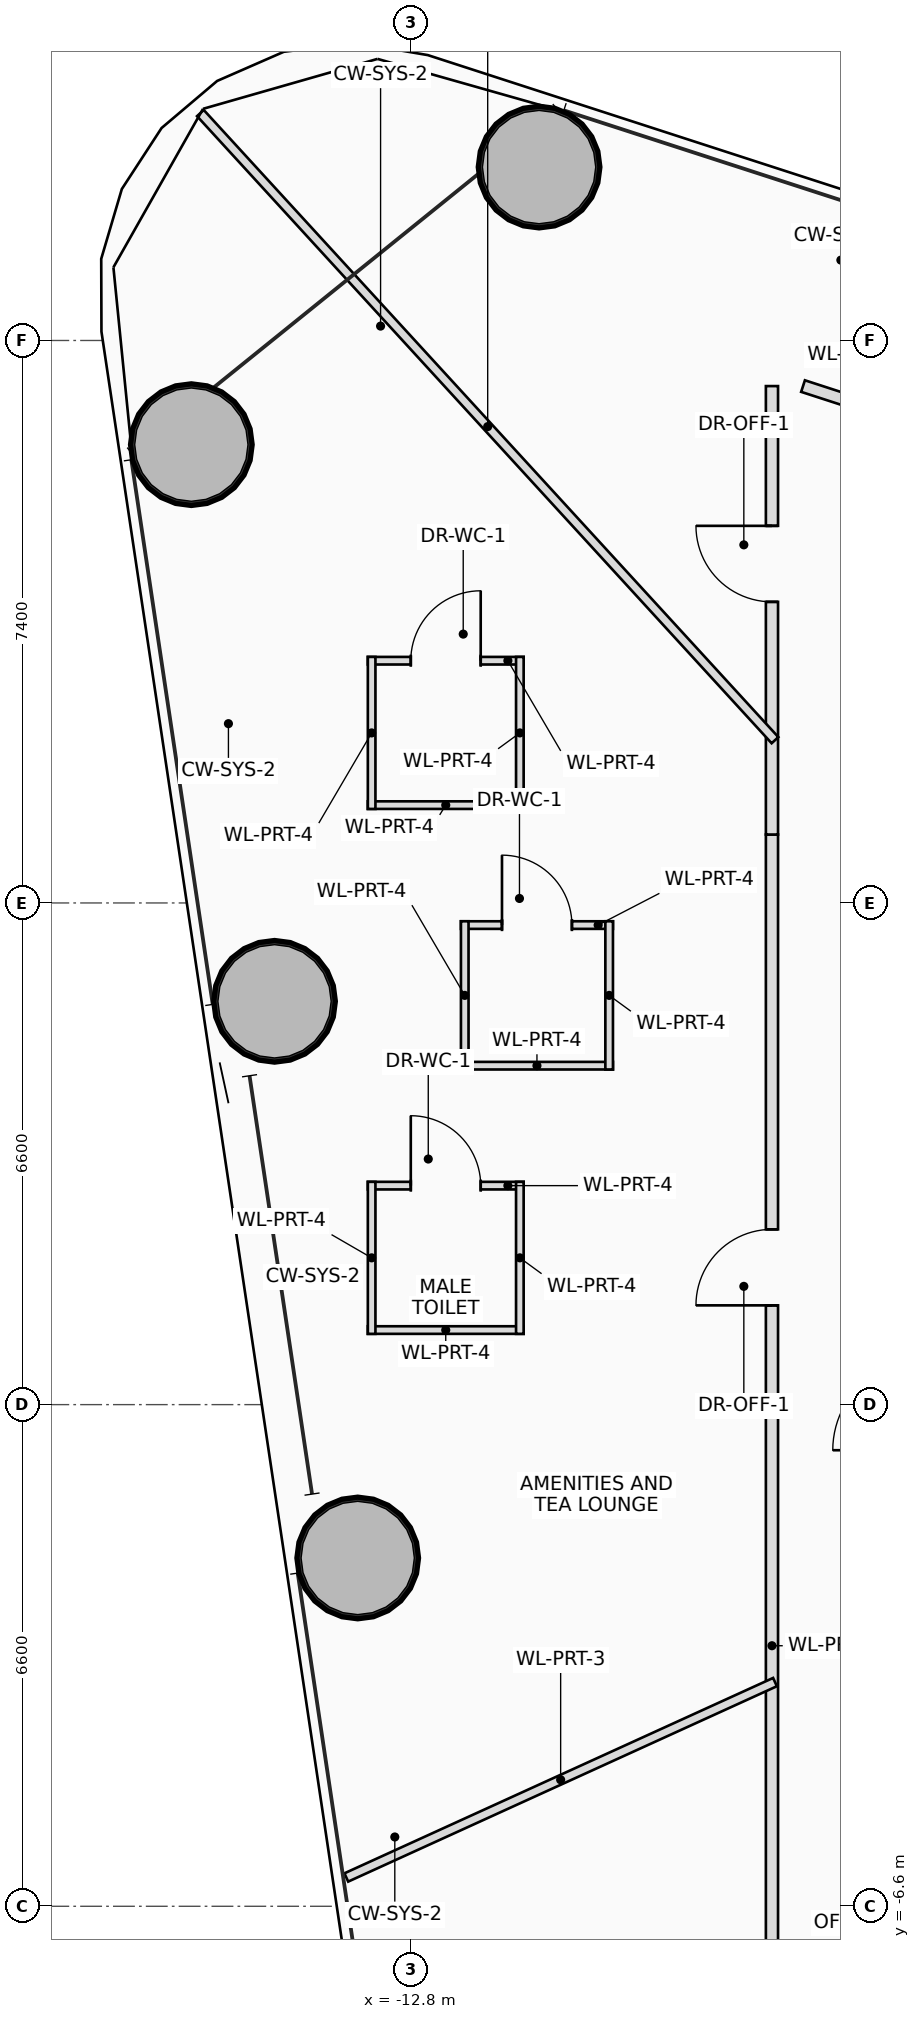
"""IFC4 building model, lengths in metres.
Left out: names, types, materials, properties, quantities, classifications, styles, units other than length and angle.
Written with IfcOpenShell. Run it as: python <this file> out.ifc"""

import sys

from ifc_helpers import new_model, si_unit, direction, frame, frame_2d, origin, origin_2d, place, context, subcontext, project, spatial, rectangle, hollow_circle, extrude, source, transform, mapped, element, fill, save


model = new_model("IFC4")
c1 = context("Model", 3, precision=1e-05, world=origin(), true_north=direction((0.0, 1.0)))
c2 = subcontext(c1, "Body", "Model", "MODEL_VIEW")
j1 = project(units=[si_unit("LENGTHUNIT", "METRE"), si_unit("PLANEANGLEUNIT", "RADIAN")], contexts=[c1])
p1 = place(None, origin())
s1 = spatial("IfcSite", under=j1, at=p1, CompositionType="ELEMENT")
p2 = place(p1, origin())
s2 = spatial("IfcBuilding", under=s1, at=p2, CompositionType="ELEMENT")
p3 = place(p2, frame((0.0, 0.0, 62.3)))
s3 = spatial("IfcBuildingStorey", under=s2, at=p3, CompositionType="ELEMENT", Elevation=62.3)
m1 = source(origin(), c2, "Body", "SweptSolid", [
    extrude(hollow_circle(Radius=0.8, WallThickness=0.055, at=origin_2d()), origin(), (0.0, 0.0, 1.0), 3.75),
])
for number, where, z_axis, x_axis in (
    (1, (-11.114, 16.281, 0.0), (0.0, 0.0, 1.0), (1.0, 0.0, 0.0)),
    (2, (-15.689, 12.629, 0.0), (0.0, 0.0, 1.0), (1.0, 0.0, 0.0)),
    (3, (-14.594, 5.306, 0.0), (0.0, 0.0, 1.0), (1.0, 0.0, 0.0)),
    (4, (-13.5, -2.018, 0.0), (0.0, 0.0, 1.0), (1.0, 0.0, 0.0)),
):
    element("IfcColumn", number, at=place(p3, frame(where, z_axis=z_axis, x_axis=x_axis)), inside=s3, PredefinedType="COLUMN", context=c2, shape_type="MappedRepresentation", body=[
        mapped(m1, transform((0.0, 0.0, 0.0), scale=1.0)),
    ])
p4 = place(p3, frame((-13.367, 2.881, 0.0), z_axis=(0.0, 0.0, 1.0), x_axis=(1.0, 0.0, 0.0)))
e5 = element("IfcWall", 5, at=p4, inside=s3, PredefinedType="PARTITIONING", context=c2, shape_type="SweptSolid", body=[
    extrude(rectangle(XDim=2.05, YDim=0.1, at=frame_2d((1.025, 0.0))), origin(), (0.0, 0.0, 1.0), 3.2),
])
p5 = place(p4, frame((0.565, 0.0, 0.0)))
e6 = element("IfcOpeningElement", 6, at=p5, cuts=e5, PredefinedType="OPENING", context=c2, shape_type="SweptSolid", body=[
    extrude(rectangle(XDim=0.92, YDim=2.1, at=frame_2d((0.46, 1.05))), frame((0.0, 0.06, 0.0), z_axis=(0.0, -1.0, 0.0), x_axis=(1.0, 0.0, 0.0)), (0.0, 0.0, 1.0), 0.12),
])
p6 = place(p3, frame((-11.317, 0.981, 0.0), z_axis=(0.0, 0.0, 1.0), x_axis=(-1.0, 0.0, 0.0)))
e7 = element("IfcWall", 7, at=p6, inside=s3, PredefinedType="PARTITIONING", context=c2, shape_type="SweptSolid", body=[
    extrude(rectangle(XDim=2.05, YDim=0.1, at=frame_2d((1.025, 0.0))), origin(), (0.0, 0.0, 1.0), 3.545),
])
p7 = place(p3, frame((-11.367, 2.931, 0.0), z_axis=(0.0, 0.0, 1.0), x_axis=(0.0, -1.0, 0.0)))
e8 = element("IfcWall", 8, at=p7, inside=s3, PredefinedType="PARTITIONING", context=c2, shape_type="SweptSolid", body=[
    extrude(rectangle(XDim=2.0, YDim=0.1, at=frame_2d((1.0, 0.0))), origin(), (0.0, 0.0, 1.0), 3.2),
])
p8 = place(p3, frame((-13.317, 0.931, 0.0), z_axis=(0.0, 0.0, 1.0), x_axis=(0.0, 1.0, 0.0)))
e9 = element("IfcWall", 9, at=p8, inside=s3, PredefinedType="PARTITIONING", context=c2, shape_type="SweptSolid", body=[
    extrude(rectangle(XDim=2.0, YDim=0.1, at=frame_2d((1.0, 0.0))), origin(), (0.0, 0.0, 1.0), 3.545),
])
p9 = place(p3, frame((-13.367, 9.787, 0.0), z_axis=(0.0, 0.0, 1.0), x_axis=(1.0, 0.0, 0.0)))
e10 = element("IfcWall", 10, at=p9, inside=s3, PredefinedType="PARTITIONING", context=c2, shape_type="SweptSolid", body=[
    extrude(rectangle(XDim=2.05, YDim=0.1, at=frame_2d((1.025, 0.0))), origin(), (0.0, 0.0, 1.0), 2.85),
])
p10 = place(p9, frame((0.565, 0.0, 0.0)))
e11 = element("IfcOpeningElement", 11, at=p10, cuts=e10, PredefinedType="OPENING", context=c2, shape_type="SweptSolid", body=[
    extrude(rectangle(XDim=0.92, YDim=2.1, at=frame_2d((0.46, 1.05))), frame((0.0, 0.06, 0.0), z_axis=(0.0, -1.0, 0.0), x_axis=(1.0, 0.0, 0.0)), (0.0, 0.0, 1.0), 0.12),
])
p11 = place(p3, frame((-11.317, 7.887, 0.0), z_axis=(0.0, 0.0, 1.0), x_axis=(-1.0, 0.0, 0.0)))
e12 = element("IfcWall", 12, at=p11, inside=s3, PredefinedType="PARTITIONING", context=c2, shape_type="SweptSolid", body=[
    extrude(rectangle(XDim=2.05, YDim=0.1, at=frame_2d((1.025, 0.0))), origin(), (0.0, 0.0, 1.0), 3.2),
])
p12 = place(p3, frame((-11.367, 9.837, 0.0), z_axis=(0.0, 0.0, 1.0), x_axis=(0.0, -1.0, 0.0)))
e13 = element("IfcWall", 13, at=p12, inside=s3, PredefinedType="PARTITIONING", context=c2, shape_type="SweptSolid", body=[
    extrude(rectangle(XDim=2.0, YDim=0.1, at=frame_2d((1.0, 0.0))), origin(), (0.0, 0.0, 1.0), 2.85),
])
p13 = place(p3, frame((-13.317, 7.837, 0.0), z_axis=(0.0, 0.0, 1.0), x_axis=(0.0, 1.0, 0.0)))
e14 = element("IfcWall", 14, at=p13, inside=s3, PredefinedType="PARTITIONING", context=c2, shape_type="SweptSolid", body=[
    extrude(rectangle(XDim=2.0, YDim=0.1, at=frame_2d((1.0, 0.0))), origin(), (0.0, 0.0, 1.0), 3.545),
])
p14 = place(p3, frame((-12.142, 6.309, 0.0), z_axis=(0.0, 0.0, 1.0), x_axis=(1.0, 0.0, 0.0)))
e15 = element("IfcWall", 15, at=p14, inside=s3, PredefinedType="PARTITIONING", context=c2, shape_type="SweptSolid", body=[
    extrude(rectangle(XDim=2.0, YDim=0.1, at=frame_2d((1.0, 0.0))), origin(), (0.0, 0.0, 1.0), 3.05),
])
p15 = place(p14, frame((0.54, 0.0, 0.0)))
e16 = element("IfcOpeningElement", 16, at=p15, cuts=e15, PredefinedType="OPENING", context=c2, shape_type="SweptSolid", body=[
    extrude(rectangle(XDim=0.92, YDim=2.1, at=frame_2d((0.46, 1.05))), frame((0.0, 0.06, 0.0), z_axis=(0.0, -1.0, 0.0), x_axis=(1.0, 0.0, 0.0)), (0.0, 0.0, 1.0), 0.12),
])
p16 = place(p3, frame((-10.142, 4.459, 0.0), z_axis=(0.0, 0.0, 1.0), x_axis=(-1.0, 0.0, 0.0)))
e17 = element("IfcWall", 17, at=p16, inside=s3, PredefinedType="PARTITIONING", context=c2, shape_type="SweptSolid", body=[
    extrude(rectangle(XDim=2.0, YDim=0.1, at=frame_2d((1.0, 0.0))), origin(), (0.0, 0.0, 1.0), 3.2),
])
for number, where, z_axis, x_axis in (
    (18, (-10.192, 6.359, 0.0), (0.0, 0.0, 1.0), (0.0, -1.0, 0.0)),
    (19, (-12.092, 4.409, 0.0), (0.0, 0.0, 1.0), (0.0, 1.0, 0.0)),
):
    element("IfcWall", number, at=place(p3, frame(where, z_axis=z_axis, x_axis=x_axis)), inside=s3, PredefinedType="PARTITIONING", context=c2, shape_type="SweptSolid", body=[
        extrude(rectangle(XDim=1.95, YDim=0.1, at=frame_2d((0.975, 0.0))), origin(), (0.0, 0.0, 1.0), 2.85),
    ])
p17 = place(p3, frame((-8.05, -7.5, 0.0), z_axis=(0.0, 0.0, 1.0), x_axis=(0.0, 1.0, 0.0)))
e20 = element("IfcWall", 20, at=p17, inside=s3, PredefinedType="PARTITIONING", context=c2, shape_type="SweptSolid", body=[
    extrude(rectangle(XDim=15.0, YDim=0.16, at=frame_2d((7.5, 0.0))), origin(), (0.0, 0.0, 1.0), 2.85),
])
p18 = place(p17, frame((8.806, 0.0, 0.0)))
e21 = element("IfcOpeningElement", 21, at=p18, cuts=e20, PredefinedType="OPENING", context=c2, shape_type="SweptSolid", body=[
    extrude(rectangle(XDim=1.0, YDim=2.25, at=frame_2d((0.5, 1.125))), frame((0.0, 0.09, 0.0), z_axis=(0.0, -1.0, 0.0), x_axis=(1.0, 0.0, 0.0)), (0.0, 0.0, 1.0), 0.18),
])
p19 = place(p3, frame((-8.05, 7.5, 0.0), z_axis=(0.0, 0.0, 1.0), x_axis=(0.0, 1.0, 0.0)))
e22 = element("IfcWall", 22, at=p19, inside=s3, PredefinedType="PARTITIONING", context=c2, shape_type="SweptSolid", body=[
    extrude(rectangle(XDim=5.9, YDim=0.16, at=frame_2d((2.95, 0.0))), origin(), (0.0, 0.0, 1.0), 2.85),
])
p20 = place(p19, frame((3.061, 0.0, 0.0)))
e23 = element("IfcOpeningElement", 23, at=p20, cuts=e22, PredefinedType="OPENING", context=c2, shape_type="SweptSolid", body=[
    extrude(rectangle(XDim=1.0, YDim=2.25, at=frame_2d((0.5, 1.125))), frame((0.0, 0.09, 0.0), z_axis=(0.0, -1.0, 0.0), x_axis=(1.0, 0.0, 0.0)), (0.0, 0.0, 1.0), 0.18),
])
p21 = place(p3, frame((-7.641, 13.4, 0.0), z_axis=(0.0, 0.0, 1.0), x_axis=(0.951277022007, -0.308337521884, 0.0)))
e24 = element("IfcWall", 24, at=p21, inside=s3, PredefinedType="PARTITIONING", context=c2, shape_type="SweptSolid", body=[
    extrude(rectangle(XDim=1.357, YDim=0.16, at=frame_2d((0.679, 0.0))), origin(), (0.0, 0.0, 1.0), 3.545),
])
p22 = place(p3, frame((-8.01, 8.741, 0.0), z_axis=(0.0, 0.0, 1.0), x_axis=(-0.675595196102, 0.737272765674, 0.0)))
e25 = element("IfcWall", 25, at=p22, inside=s3, PredefinedType="PARTITIONING", context=c2, shape_type="SweptSolid", body=[
    extrude(rectangle(XDim=11.19, YDim=0.12, at=frame_2d((5.595, 0.0))), origin(), (0.0, 0.0, 1.0), 3.01),
])
p23 = place(p3, frame((-8.01, -3.65, 0.0), z_axis=(0.0, 0.0, 1.0), x_axis=(-0.909955974898, -0.414704863425, 0.0)))
e26 = element("IfcWall", 26, at=p23, inside=s3, PredefinedType="PARTITIONING", context=c2, shape_type="SweptSolid", body=[
    extrude(rectangle(XDim=6.198, YDim=0.12, at=frame_2d((3.099, 0.0))), origin(), (0.0, 0.0, 1.0), 2.85),
])
p24 = place(p5, origin())
e27 = element("IfcDoor", 27, at=p24, inside=s3, OperationType="SINGLE_SWING_LEFT", PredefinedType="DOOR", context=c2, shape_type="SweptSolid", body=[
    extrude(rectangle(XDim=0.92, YDim=2.1, at=frame_2d((0.46, 1.05))), frame((0.0, 0.025, 0.0), z_axis=(0.0, -1.0, 0.0), x_axis=(1.0, 0.0, 0.0)), (0.0, 0.0, 1.0), 0.05),
])
fill(e6, e27)
p25 = place(p10, origin())
e28 = element("IfcDoor", 28, at=p25, inside=s3, OperationType="SINGLE_SWING_RIGHT", PredefinedType="DOOR", context=c2, shape_type="SweptSolid", body=[
    extrude(rectangle(XDim=0.92, YDim=2.1, at=frame_2d((0.46, 1.05))), frame((0.0, 0.025, 0.0), z_axis=(0.0, -1.0, 0.0), x_axis=(1.0, 0.0, 0.0)), (0.0, 0.0, 1.0), 0.05),
])
fill(e11, e28)
p26 = place(p15, origin())
e29 = element("IfcDoor", 29, at=p26, inside=s3, OperationType="SINGLE_SWING_LEFT", PredefinedType="DOOR", context=c2, shape_type="SweptSolid", body=[
    extrude(rectangle(XDim=0.92, YDim=2.1, at=frame_2d((0.46, 1.05))), frame((0.0, 0.025, 0.0), z_axis=(0.0, -1.0, 0.0), x_axis=(1.0, 0.0, 0.0)), (0.0, 0.0, 1.0), 0.05),
])
fill(e16, e29)
p27 = place(p18, origin())
e30 = element("IfcDoor", 30, at=p27, inside=s3, OperationType="SINGLE_SWING_LEFT", PredefinedType="DOOR", context=c2, shape_type="SweptSolid", body=[
    extrude(rectangle(XDim=1.0, YDim=2.25, at=frame_2d((0.5, 1.125))), frame((0.0, 0.025, 0.0), z_axis=(0.0, -1.0, 0.0), x_axis=(1.0, 0.0, 0.0)), (0.0, 0.0, 1.0), 0.05),
])
fill(e21, e30)
p28 = place(p20, origin())
e31 = element("IfcDoor", 31, at=p28, inside=s3, OperationType="SINGLE_SWING_RIGHT", PredefinedType="DOOR", context=c2, shape_type="SweptSolid", body=[
    extrude(rectangle(XDim=1.0, YDim=2.25, at=frame_2d((0.5, 1.125))), frame((0.0, 0.025, 0.0), z_axis=(0.0, -1.0, 0.0), x_axis=(1.0, 0.0, 0.0)), (0.0, 0.0, 1.0), 0.05),
])
fill(e23, e31)
save(model, sys.argv[1])
